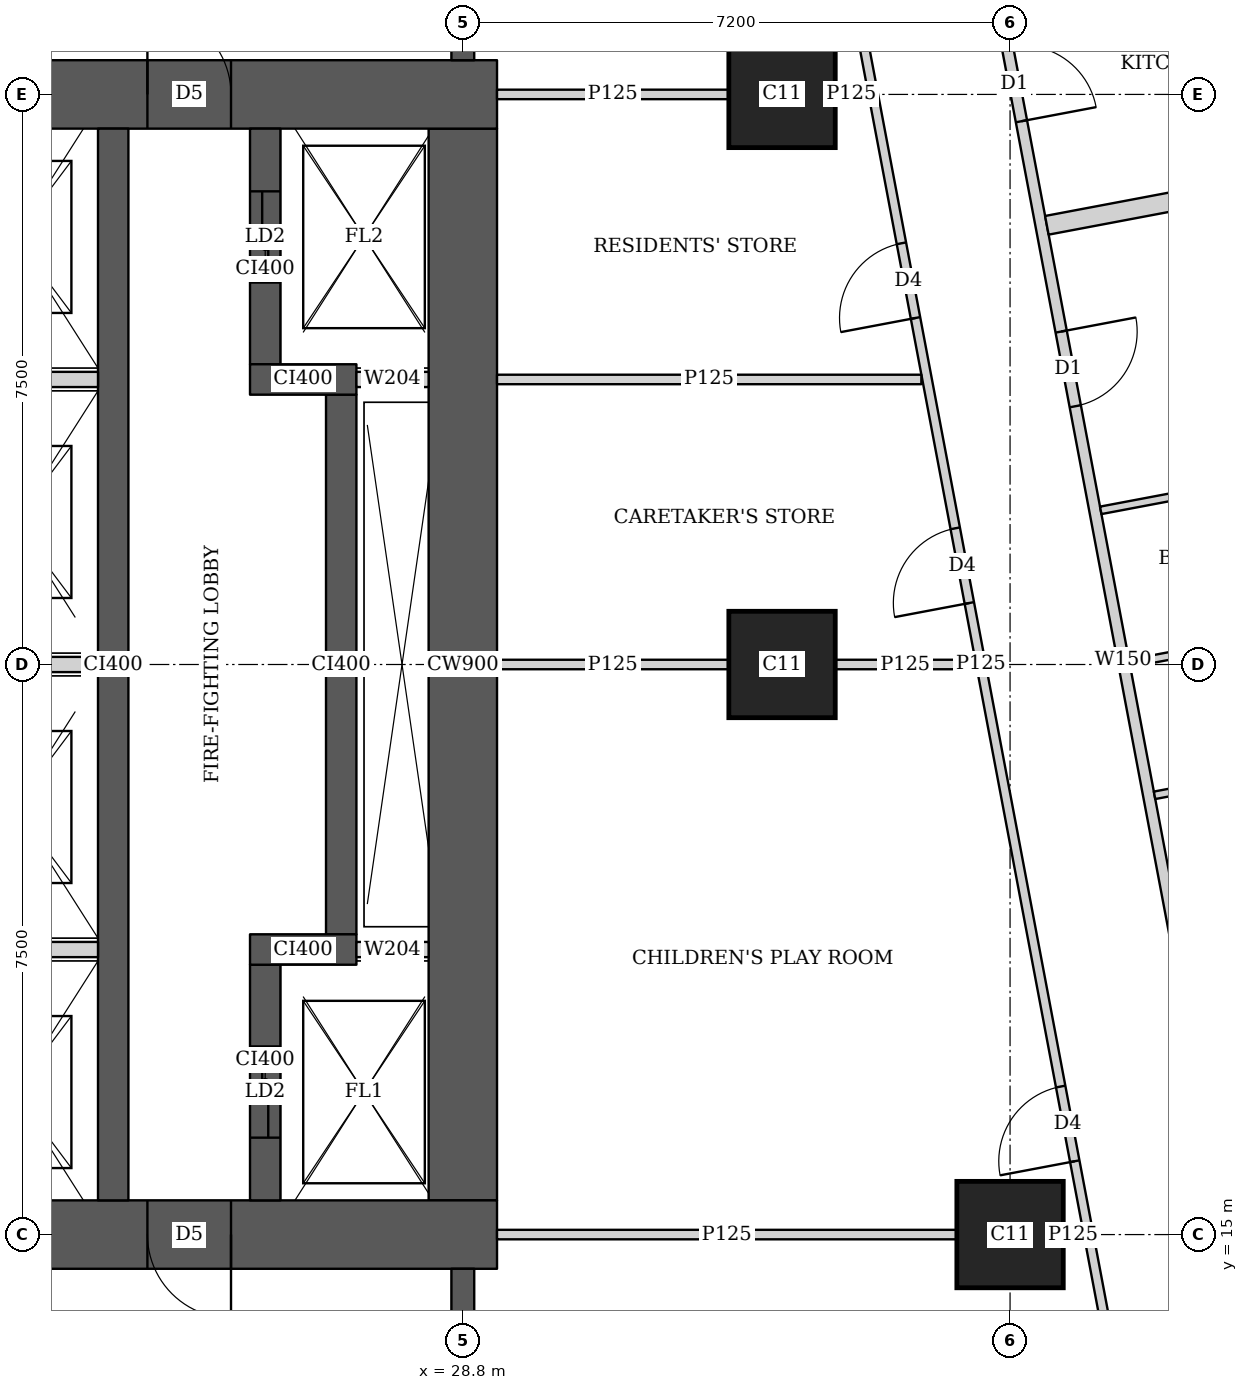
"""IFC4 building model, lengths in metres.
Left out: names, types, materials, properties, quantities, classifications, styles, units other than length and angle.
Written with IfcOpenShell. Run it as: python <this file> out.ifc"""

import sys

from ifc_helpers import new_model, si_unit, direction, frame, frame_2d, origin, origin_2d, place, context, subcontext, project, spatial, rectangle, extrude, element, fill, save


model = new_model("IFC4")
c1 = context("Model", 3, precision=1e-05, world=origin(), true_north=direction((0.0, 1.0)))
c2 = subcontext(c1, "Body", "Model", "MODEL_VIEW")
j1 = project(units=[si_unit("LENGTHUNIT", "METRE"), si_unit("PLANEANGLEUNIT", "RADIAN")], contexts=[c1])
p1 = place(None, origin())
s1 = spatial("IfcSite", under=j1, at=p1, CompositionType="ELEMENT")
p2 = place(p1, origin())
s2 = spatial("IfcBuilding", under=s1, at=p2, CompositionType="ELEMENT")
p3 = place(p2, frame((0.0, 0.0, 212.45)))
s3 = spatial("IfcBuildingStorey", under=s2, at=p3, CompositionType="ELEMENT", Elevation=212.45)
for number, where, z_axis, x_axis in (
    (1, (36.0, 15.0, 0.0), (0.0, 0.0, 1.0), (1.0, 0.0, 0.0)),
    (2, (33.0, 22.5, 0.0), (0.0, 0.0, 1.0), (1.0, 0.0, 0.0)),
    (3, (33.0, 30.0, 0.0), (0.0, 0.0, 1.0), (1.0, 0.0, 0.0)),
):
    element("IfcColumn", number, at=place(p3, frame(where, z_axis=z_axis, x_axis=x_axis)), inside=s3, PredefinedType="COLUMN", context=c2, shape_type="SweptSolid", body=[
        extrude(rectangle(XDim=1.4, YDim=1.4, at=origin_2d()), origin(), (0.0, 0.0, 1.0), 3.75),
    ])
p4 = place(p3, frame((13.95, 15.0, 0.0), z_axis=(0.0, 0.0, 1.0), x_axis=(1.0, 0.0, 0.0)))
e4 = element("IfcWall", 4, at=p4, inside=s3, PredefinedType="SHEAR", context=c2, shape_type="SweptSolid", body=[
    extrude(rectangle(XDim=15.3, YDim=0.9, at=frame_2d((7.65, 0.0))), origin(), (0.0, 0.0, 1.0), 3.75),
])
p5 = place(p4, frame((4.45, 0.0, 0.0)))
e5 = element("IfcOpeningElement", 5, at=p5, cuts=e4, PredefinedType="OPENING", context=c2, shape_type="SweptSolid", body=[
    extrude(rectangle(XDim=1.8, YDim=2.1, at=frame_2d((0.9, 1.05))), frame((0.0, 0.46, 0.0), z_axis=(0.0, -1.0, 0.0), x_axis=(1.0, 0.0, 0.0)), (0.0, 0.0, 1.0), 0.92),
])
p6 = place(p4, frame((10.7, 0.0, 0.0)))
e6 = element("IfcOpeningElement", 6, at=p6, cuts=e4, PredefinedType="OPENING", context=c2, shape_type="SweptSolid", body=[
    extrude(rectangle(XDim=1.1, YDim=2.1, at=frame_2d((0.55, 1.05))), frame((0.0, 0.46, 0.0), z_axis=(0.0, -1.0, 0.0), x_axis=(1.0, 0.0, 0.0)), (0.0, 0.0, 1.0), 0.92),
])
p7 = place(p3, frame((13.95, 30.0, 0.0), z_axis=(0.0, 0.0, 1.0), x_axis=(1.0, 0.0, 0.0)))
e7 = element("IfcWall", 7, at=p7, inside=s3, PredefinedType="SHEAR", context=c2, shape_type="SweptSolid", body=[
    extrude(rectangle(XDim=15.3, YDim=0.9, at=frame_2d((7.65, 0.0))), origin(), (0.0, 0.0, 1.0), 3.75),
])
p8 = place(p7, frame((4.45, 0.0, 0.0)))
e8 = element("IfcOpeningElement", 8, at=p8, cuts=e7, PredefinedType="OPENING", context=c2, shape_type="SweptSolid", body=[
    extrude(rectangle(XDim=1.8, YDim=2.1, at=frame_2d((0.9, 1.05))), frame((0.0, 0.46, 0.0), z_axis=(0.0, -1.0, 0.0), x_axis=(1.0, 0.0, 0.0)), (0.0, 0.0, 1.0), 0.92),
])
p9 = place(p7, frame((10.7, 0.0, 0.0)))
e9 = element("IfcOpeningElement", 9, at=p9, cuts=e7, PredefinedType="OPENING", context=c2, shape_type="SweptSolid", body=[
    extrude(rectangle(XDim=1.1, YDim=2.1, at=frame_2d((0.55, 1.05))), frame((0.0, 0.46, 0.0), z_axis=(0.0, -1.0, 0.0), x_axis=(1.0, 0.0, 0.0)), (0.0, 0.0, 1.0), 0.92),
])
p10 = place(p3, frame((28.8, 15.45, 0.0), z_axis=(0.0, 0.0, 1.0), x_axis=(0.0, 1.0, 0.0)))
e10 = element("IfcWall", 10, at=p10, inside=s3, PredefinedType="SHEAR", context=c2, shape_type="SweptSolid", body=[
    extrude(rectangle(XDim=14.1, YDim=0.9, at=frame_2d((7.05, 0.0))), origin(), (0.0, 0.0, 1.0), 3.75),
])
p11 = place(p3, frame((24.2, 15.45, 0.0), z_axis=(0.0, 0.0, 1.0), x_axis=(0.0, 1.0, 0.0)))
e11 = element("IfcWall", 11, at=p11, inside=s3, PredefinedType="SHEAR", context=c2, shape_type="SweptSolid", body=[
    extrude(rectangle(XDim=14.1, YDim=0.4, at=frame_2d((7.05, 0.0))), origin(), (0.0, 0.0, 1.0), 3.75),
])
p12 = place(p3, frame((26.2, 15.45, 0.0), z_axis=(0.0, 0.0, 1.0), x_axis=(0.0, 1.0, 0.0)))
e12 = element("IfcWall", 12, at=p12, inside=s3, PredefinedType="SHEAR", context=c2, shape_type="SweptSolid", body=[
    extrude(rectangle(XDim=3.1, YDim=0.4, at=frame_2d((1.55, 0.0))), origin(), (0.0, 0.0, 1.0), 3.75),
])
p13 = place(p12, frame((0.825, 0.0, 0.0)))
e13 = element("IfcOpeningElement", 13, at=p13, cuts=e12, PredefinedType="OPENING", context=c2, shape_type="SweptSolid", body=[
    extrude(rectangle(XDim=1.2, YDim=2.1, at=frame_2d((0.6, 1.05))), frame((0.0, 0.21, 0.0), z_axis=(0.0, -1.0, 0.0), x_axis=(1.0, 0.0, 0.0)), (0.0, 0.0, 1.0), 0.42),
])
p14 = place(p3, frame((26.0, 18.75, 0.0), z_axis=(0.0, 0.0, 1.0), x_axis=(1.0, 0.0, 0.0)))
e14 = element("IfcWall", 14, at=p14, inside=s3, PredefinedType="SHEAR", context=c2, shape_type="SweptSolid", body=[
    extrude(rectangle(XDim=1.4, YDim=0.4, at=frame_2d((0.7, 0.0))), origin(), (0.0, 0.0, 1.0), 3.75),
])
p15 = place(p3, frame((27.2, 18.95, 0.0), z_axis=(0.0, 0.0, 1.0), x_axis=(0.0, 1.0, 0.0)))
e15 = element("IfcWall", 15, at=p15, inside=s3, PredefinedType="SHEAR", context=c2, shape_type="SweptSolid", body=[
    extrude(rectangle(XDim=7.1, YDim=0.4, at=frame_2d((3.55, 0.0))), origin(), (0.0, 0.0, 1.0), 3.75),
])
p16 = place(p3, frame((26.0, 26.25, 0.0), z_axis=(0.0, 0.0, 1.0), x_axis=(1.0, 0.0, 0.0)))
e16 = element("IfcWall", 16, at=p16, inside=s3, PredefinedType="SHEAR", context=c2, shape_type="SweptSolid", body=[
    extrude(rectangle(XDim=1.4, YDim=0.4, at=frame_2d((0.7, 0.0))), origin(), (0.0, 0.0, 1.0), 3.75),
])
p17 = place(p3, frame((26.2, 26.45, 0.0), z_axis=(0.0, 0.0, 1.0), x_axis=(0.0, 1.0, 0.0)))
e17 = element("IfcWall", 17, at=p17, inside=s3, PredefinedType="SHEAR", context=c2, shape_type="SweptSolid", body=[
    extrude(rectangle(XDim=3.1, YDim=0.4, at=frame_2d((1.55, 0.0))), origin(), (0.0, 0.0, 1.0), 3.75),
])
p18 = place(p17, frame((1.075, 0.0, 0.0)))
e18 = element("IfcOpeningElement", 18, at=p18, cuts=e17, PredefinedType="OPENING", context=c2, shape_type="SweptSolid", body=[
    extrude(rectangle(XDim=1.2, YDim=2.1, at=frame_2d((0.6, 1.05))), frame((0.0, 0.21, 0.0), z_axis=(0.0, -1.0, 0.0), x_axis=(1.0, 0.0, 0.0)), (0.0, 0.0, 1.0), 0.42),
])
for number, where, z_axis, x_axis in (
    (19, (28.8, 10.35, 0.0), (0.0, 0.0, 1.0), (0.0, 1.0, 0.0)),
    (20, (28.8, 30.45, 0.0), (0.0, 0.0, 1.0), (0.0, 1.0, 0.0)),
):
    element("IfcWall", number, at=place(p3, frame(where, z_axis=z_axis, x_axis=x_axis)), inside=s3, PredefinedType="SHEAR", context=c2, shape_type="SweptSolid", body=[
        extrude(rectangle(XDim=4.2, YDim=0.3, at=frame_2d((2.1, 0.0))), origin(), (0.0, 0.0, 1.0), 3.75),
    ])
p19 = place(p3, frame((33.68, 42.723, 0.0), z_axis=(0.0, 0.0, 1.0), x_axis=(0.185601160014, -0.982625162207, 0.0)))
e21 = element("IfcWall", 21, at=p19, inside=s3, PredefinedType="SOLIDWALL", context=c2, shape_type="SweptSolid", body=[
    extrude(rectangle(XDim=41.051, YDim=0.15, at=frame_2d((20.526, 0.0))), origin(), (0.0, 0.0, 1.0), 2.5),
])
p20 = place(p19, frame((12.307, 0.0, 0.0)))
e22 = element("IfcOpeningElement", 22, at=p20, cuts=e21, PredefinedType="OPENING", context=c2, shape_type="SweptSolid", body=[
    extrude(rectangle(XDim=1.0, YDim=2.1, at=frame_2d((0.5, 1.05))), frame((0.0, 0.085, 0.0), z_axis=(0.0, -1.0, 0.0), x_axis=(1.0, 0.0, 0.0)), (0.0, 0.0, 1.0), 0.17),
])
p21 = place(p19, frame((16.123, 0.0, 0.0)))
e23 = element("IfcOpeningElement", 23, at=p21, cuts=e21, PredefinedType="OPENING", context=c2, shape_type="SweptSolid", body=[
    extrude(rectangle(XDim=1.0, YDim=2.1, at=frame_2d((0.5, 1.05))), frame((0.0, 0.085, 0.0), z_axis=(0.0, -1.0, 0.0), x_axis=(1.0, 0.0, 0.0)), (0.0, 0.0, 1.0), 0.17),
])
p22 = place(p19, frame((30.902, 0.0, 0.0)))
e24 = element("IfcOpeningElement", 24, at=p22, cuts=e21, PredefinedType="OPENING", context=c2, shape_type="SweptSolid", body=[
    extrude(rectangle(XDim=1.0, YDim=2.1, at=frame_2d((0.5, 1.05))), frame((0.0, 0.085, 0.0), z_axis=(0.0, -1.0, 0.0), x_axis=(1.0, 0.0, 0.0)), (0.0, 0.0, 1.0), 0.17),
])
p23 = place(p3, frame((40.657, 25.183, 0.0), z_axis=(0.0, 0.0, 1.0), x_axis=(-0.982585626838, -0.185810349366, 0.0)))
e25 = element("IfcWall", 25, at=p23, inside=s3, PredefinedType="PARTITIONING", context=c2, shape_type="SweptSolid", body=[
    extrude(rectangle(XDim=3.525, YDim=0.1, at=frame_2d((1.763, 0.0))), origin(), (0.0, 0.0, 1.0), 3.5),
])
p24 = place(p3, frame((41.365, 21.433, 0.0), z_axis=(0.0, 0.0, 1.0), x_axis=(-0.982638553676, -0.185530247748, 0.0)))
e26 = element("IfcWall", 26, at=p24, inside=s3, PredefinedType="PARTITIONING", context=c2, shape_type="SweptSolid", body=[
    extrude(rectangle(XDim=3.525, YDim=0.1, at=frame_2d((1.763, 0.0))), origin(), (0.0, 0.0, 1.0), 3.5),
])
p25 = place(p3, frame((41.037, 23.168, 0.0), z_axis=(0.0, 0.0, 1.0), x_axis=(-0.982638553676, -0.185530247748, 0.0)))
e27 = element("IfcWall", 27, at=p25, inside=s3, PredefinedType="PARTITIONING", context=c2, shape_type="SweptSolid", body=[
    extrude(rectangle(XDim=3.525, YDim=0.1, at=frame_2d((1.763, 0.0))), origin(), (0.0, 0.0, 1.0), 2.5),
])
p26 = place(p3, frame((41.177, 29.164, 0.0), z_axis=(0.0, 0.0, 1.0), x_axis=(-0.982642846239, -0.185507511263, 0.0)))
e28 = element("IfcWall", 28, at=p26, inside=s3, PredefinedType="SOLIDWALL", context=c2, shape_type="SweptSolid", body=[
    extrude(rectangle(XDim=4.776, YDim=0.25, at=frame_2d((2.388, 0.0))), origin(), (0.0, 0.0, 1.0), 2.5),
])
p27 = place(p3, frame((37.9, 10.413, 0.0), z_axis=(0.0, 0.0, 1.0), x_axis=(-0.185589740669, 0.982627319058, 0.0)))
e29 = element("IfcWall", 29, at=p27, inside=s3, PredefinedType="PARTITIONING", context=c2, shape_type="SweptSolid", body=[
    extrude(rectangle(XDim=24.602, YDim=0.125, at=frame_2d((12.301, 0.0))), origin(), (0.0, 0.0, 1.0), 2.5),
])
p28 = place(p27, frame((0.708, 0.0, 0.0)))
e30 = element("IfcOpeningElement", 30, at=p28, cuts=e29, PredefinedType="OPENING", context=c2, shape_type="SweptSolid", body=[
    extrude(rectangle(XDim=1.0, YDim=2.1, at=frame_2d((0.5, 1.05))), frame((0.0, 0.073, 0.0), z_axis=(0.0, -1.0, 0.0), x_axis=(1.0, 0.0, 0.0)), (0.0, 0.0, 1.0), 0.145),
])
p29 = place(p27, frame((5.65, 0.0, 0.0)))
e31 = element("IfcOpeningElement", 31, at=p29, cuts=e29, PredefinedType="OPENING", context=c2, shape_type="SweptSolid", body=[
    extrude(rectangle(XDim=1.0, YDim=2.1, at=frame_2d((0.5, 1.05))), frame((0.0, 0.073, 0.0), z_axis=(0.0, -1.0, 0.0), x_axis=(1.0, 0.0, 0.0)), (0.0, 0.0, 1.0), 0.145),
])
p30 = place(p27, frame((13.124, 0.0, 0.0)))
e32 = element("IfcOpeningElement", 32, at=p30, cuts=e29, PredefinedType="OPENING", context=c2, shape_type="SweptSolid", body=[
    extrude(rectangle(XDim=1.0, YDim=2.1, at=frame_2d((0.5, 1.05))), frame((0.0, 0.073, 0.0), z_axis=(0.0, -1.0, 0.0), x_axis=(1.0, 0.0, 0.0)), (0.0, 0.0, 1.0), 0.145),
])
p31 = place(p27, frame((16.94, 0.0, 0.0)))
e33 = element("IfcOpeningElement", 33, at=p31, cuts=e29, PredefinedType="OPENING", context=c2, shape_type="SweptSolid", body=[
    extrude(rectangle(XDim=1.0, YDim=2.1, at=frame_2d((0.5, 1.05))), frame((0.0, 0.073, 0.0), z_axis=(0.0, -1.0, 0.0), x_axis=(1.0, 0.0, 0.0)), (0.0, 0.0, 1.0), 0.145),
])
p32 = place(p27, frame((20.9, 0.0, 0.0)))
e34 = element("IfcOpeningElement", 34, at=p32, cuts=e29, PredefinedType="OPENING", context=c2, shape_type="SweptSolid", body=[
    extrude(rectangle(XDim=1.0, YDim=2.1, at=frame_2d((0.5, 1.05))), frame((0.0, 0.073, 0.0), z_axis=(0.0, -1.0, 0.0), x_axis=(1.0, 0.0, 0.0)), (0.0, 0.0, 1.0), 0.145),
])
p33 = place(p3, frame((29.25, 15.0, 0.0), z_axis=(0.0, 0.0, 1.0), x_axis=(1.0, 0.0, 0.0)))
e35 = element("IfcWall", 35, at=p33, inside=s3, PredefinedType="PARTITIONING", context=c2, shape_type="SweptSolid", body=[
    extrude(rectangle(XDim=6.049, YDim=0.125, at=frame_2d((3.024, 0.0))), origin(), (0.0, 0.0, 1.0), 3.5),
])
p34 = place(p3, frame((36.701, 15.0, 0.0), z_axis=(0.0, 0.0, 1.0), x_axis=(1.0, 0.0, 0.0)))
e36 = element("IfcWall", 36, at=p34, inside=s3, PredefinedType="PARTITIONING", context=c2, shape_type="SweptSolid", body=[
    extrude(rectangle(XDim=0.257, YDim=0.125, at=frame_2d((0.128, 0.0))), origin(), (0.0, 0.0, 1.0), 3.5),
])
p35 = place(p3, frame((29.25, 22.5, 0.0), z_axis=(0.0, 0.0, 1.0), x_axis=(1.0, 0.0, 0.0)))
e37 = element("IfcWall", 37, at=p35, inside=s3, PredefinedType="PARTITIONING", context=c2, shape_type="SweptSolid", body=[
    extrude(rectangle(XDim=3.049, YDim=0.125, at=frame_2d((1.524, 0.0))), origin(), (0.0, 0.0, 1.0), 3.5),
])
p36 = place(p3, frame((33.701, 22.5, 0.0), z_axis=(0.0, 0.0, 1.0), x_axis=(1.0, 0.0, 0.0)))
e38 = element("IfcWall", 38, at=p36, inside=s3, PredefinedType="PARTITIONING", context=c2, shape_type="SweptSolid", body=[
    extrude(rectangle(XDim=1.841, YDim=0.125, at=frame_2d((0.92, 0.0))), origin(), (0.0, 0.0, 1.0), 2.5),
])
p37 = place(p3, frame((29.25, 26.25, 0.0), z_axis=(0.0, 0.0, 1.0), x_axis=(1.0, 0.0, 0.0)))
e39 = element("IfcWall", 39, at=p37, inside=s3, PredefinedType="PARTITIONING", context=c2, shape_type="SweptSolid", body=[
    extrude(rectangle(XDim=5.583, YDim=0.125, at=frame_2d((2.792, 0.0))), origin(), (0.0, 0.0, 1.0), 3.5),
])
p38 = place(p3, frame((29.25, 30.0, 0.0), z_axis=(0.0, 0.0, 1.0), x_axis=(1.0, 0.0, 0.0)))
e40 = element("IfcWall", 40, at=p38, inside=s3, PredefinedType="PARTITIONING", context=c2, shape_type="SweptSolid", body=[
    extrude(rectangle(XDim=3.049, YDim=0.125, at=frame_2d((1.524, 0.0))), origin(), (0.0, 0.0, 1.0), 3.5),
])
p39 = place(p3, frame((33.701, 30.0, 0.0), z_axis=(0.0, 0.0, 1.0), x_axis=(1.0, 0.0, 0.0)))
e41 = element("IfcWall", 41, at=p39, inside=s3, PredefinedType="PARTITIONING", context=c2, shape_type="SweptSolid", body=[
    extrude(rectangle(XDim=0.424, YDim=0.125, at=frame_2d((0.212, 0.0))), origin(), (0.0, 0.0, 1.0), 2.5),
])
for number, where, z_axis, x_axis in (
    (42, (21.8, 18.75, 0.0), (0.0, 0.0, 1.0), (1.0, 0.0, 0.0)),
    (43, (21.8, 22.5, 0.0), (0.0, 0.0, 1.0), (1.0, 0.0, 0.0)),
    (44, (21.8, 26.25, 0.0), (0.0, 0.0, 1.0), (1.0, 0.0, 0.0)),
):
    element("IfcWall", number, at=place(p3, frame(where, z_axis=z_axis, x_axis=x_axis)), inside=s3, PredefinedType="SOLIDWALL", context=c2, shape_type="SweptSolid", body=[
        extrude(rectangle(XDim=2.2, YDim=0.2, at=frame_2d((1.1, 0.0))), origin(), (0.0, 0.0, 1.0), 3.5),
    ])
for number, where, z_axis, x_axis in (
    (45, (27.4, 18.75, 0.0), (0.0, 0.0, 1.0), (1.0, 0.0, 0.0)),
    (46, (27.4, 26.25, 0.0), (0.0, 0.0, 1.0), (1.0, 0.0, 0.0)),
):
    element("IfcWall", number, at=place(p3, frame(where, z_axis=z_axis, x_axis=x_axis)), inside=s3, PredefinedType="SOLIDWALL", context=c2, shape_type="SweptSolid", body=[
        extrude(rectangle(XDim=0.95, YDim=0.2, at=frame_2d((0.475, 0.0))), origin(), (0.0, 0.0, 1.0), 3.5),
    ])
p40 = place(p20, origin())
e47 = element("IfcDoor", 47, at=p40, inside=s3, OperationType="SINGLE_SWING_RIGHT", PredefinedType="DOOR", context=c2, shape_type="SweptSolid", body=[
    extrude(rectangle(XDim=1.0, YDim=2.1, at=frame_2d((0.5, 1.05))), frame((0.0, 0.025, 0.0), z_axis=(0.0, -1.0, 0.0), x_axis=(1.0, 0.0, 0.0)), (0.0, 0.0, 1.0), 0.05),
])
fill(e22, e47)
p41 = place(p21, origin())
e48 = element("IfcDoor", 48, at=p41, inside=s3, OperationType="SINGLE_SWING_LEFT", PredefinedType="DOOR", context=c2, shape_type="SweptSolid", body=[
    extrude(rectangle(XDim=1.0, YDim=2.1, at=frame_2d((0.5, 1.05))), frame((0.0, 0.025, 0.0), z_axis=(0.0, -1.0, 0.0), x_axis=(1.0, 0.0, 0.0)), (0.0, 0.0, 1.0), 0.05),
])
fill(e23, e48)
p42 = place(p29, origin())
e49 = element("IfcDoor", 49, at=p42, inside=s3, OperationType="SINGLE_SWING_LEFT", PredefinedType="DOOR", context=c2, shape_type="SweptSolid", body=[
    extrude(rectangle(XDim=1.0, YDim=2.1, at=frame_2d((0.5, 1.05))), frame((0.0, 0.025, 0.0), z_axis=(0.0, -1.0, 0.0), x_axis=(1.0, 0.0, 0.0)), (0.0, 0.0, 1.0), 0.05),
])
fill(e31, e49)
p43 = place(p30, origin())
e50 = element("IfcDoor", 50, at=p43, inside=s3, OperationType="SINGLE_SWING_LEFT", PredefinedType="DOOR", context=c2, shape_type="SweptSolid", body=[
    extrude(rectangle(XDim=1.0, YDim=2.1, at=frame_2d((0.5, 1.05))), frame((0.0, 0.025, 0.0), z_axis=(0.0, -1.0, 0.0), x_axis=(1.0, 0.0, 0.0)), (0.0, 0.0, 1.0), 0.05),
])
fill(e32, e50)
p44 = place(p31, origin())
e51 = element("IfcDoor", 51, at=p44, inside=s3, OperationType="SINGLE_SWING_LEFT", PredefinedType="DOOR", context=c2, shape_type="SweptSolid", body=[
    extrude(rectangle(XDim=1.0, YDim=2.1, at=frame_2d((0.5, 1.05))), frame((0.0, 0.025, 0.0), z_axis=(0.0, -1.0, 0.0), x_axis=(1.0, 0.0, 0.0)), (0.0, 0.0, 1.0), 0.05),
])
fill(e33, e51)
p45 = place(p6, origin())
e52 = element("IfcDoor", 52, at=p45, inside=s3, OperationType="SINGLE_SWING_LEFT", PredefinedType="DOOR", context=c2, shape_type="SweptSolid", body=[
    extrude(rectangle(XDim=1.1, YDim=2.1, at=frame_2d((0.55, 1.05))), frame((0.0, 0.025, 0.0), z_axis=(0.0, -1.0, 0.0), x_axis=(1.0, 0.0, 0.0)), (0.0, 0.0, 1.0), 0.05),
])
fill(e6, e52)
p46 = place(p9, origin())
e53 = element("IfcDoor", 53, at=p46, inside=s3, OperationType="SINGLE_SWING_LEFT", PredefinedType="DOOR", context=c2, shape_type="SweptSolid", body=[
    extrude(rectangle(XDim=1.1, YDim=2.1, at=frame_2d((0.55, 1.05))), frame((0.0, 0.025, 0.0), z_axis=(0.0, -1.0, 0.0), x_axis=(1.0, 0.0, 0.0)), (0.0, 0.0, 1.0), 0.05),
])
fill(e9, e53)
p47 = place(p13, origin())
e54 = element("IfcDoor", 54, at=p47, inside=s3, OperationType="DOUBLE_DOOR_SLIDING", PredefinedType="DOOR", context=c2, shape_type="SweptSolid", body=[
    extrude(rectangle(XDim=1.2, YDim=2.1, at=frame_2d((0.6, 1.05))), frame((0.0, 0.025, 0.0), z_axis=(0.0, -1.0, 0.0), x_axis=(1.0, 0.0, 0.0)), (0.0, 0.0, 1.0), 0.05),
])
fill(e13, e54)
p48 = place(p18, origin())
e55 = element("IfcDoor", 55, at=p48, inside=s3, OperationType="DOUBLE_DOOR_SLIDING", PredefinedType="DOOR", context=c2, shape_type="SweptSolid", body=[
    extrude(rectangle(XDim=1.2, YDim=2.1, at=frame_2d((0.6, 1.05))), frame((0.0, 0.025, 0.0), z_axis=(0.0, -1.0, 0.0), x_axis=(1.0, 0.0, 0.0)), (0.0, 0.0, 1.0), 0.05),
])
fill(e18, e55)
save(model, sys.argv[1])
